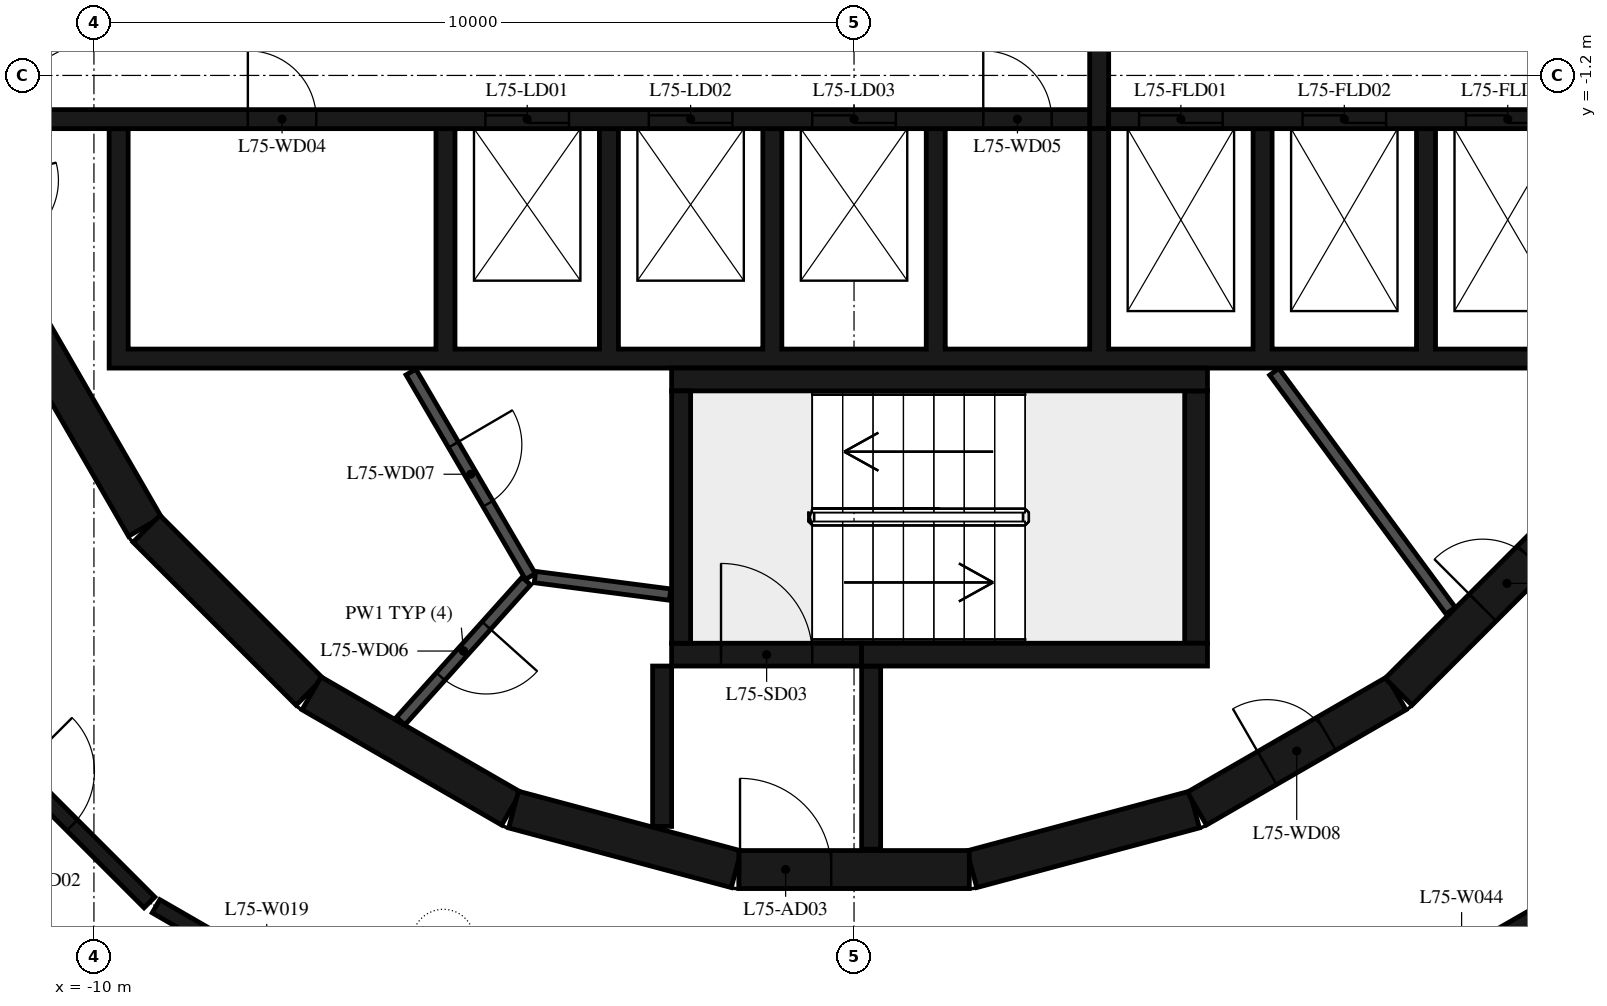
"""IFC4 building model, lengths in metres.
Left out: names, types, materials, properties, quantities, classifications, styles, units other than length and angle.
Written with IfcOpenShell. Run it as: python <this file> out.ifc"""

import sys

from ifc_helpers import new_model, si_unit, direction, frame, frame_2d, origin, place, context, subcontext, project, spatial, polyline, rectangle, outline, extrude, element, fill, save


model = new_model("IFC4")
c1 = context("Model", 3, precision=1e-05, world=origin(), true_north=direction((0.0, 1.0)))
c2 = subcontext(c1, "Body", "Model", "MODEL_VIEW")
j1 = project(units=[si_unit("LENGTHUNIT", "METRE"), si_unit("PLANEANGLEUNIT", "RADIAN")], contexts=[c1])
p1 = place(None, origin())
s1 = spatial("IfcSite", under=j1, at=p1, CompositionType="ELEMENT")
p2 = place(p1, origin())
s2 = spatial("IfcBuilding", under=s1, at=p2, CompositionType="ELEMENT")
p3 = place(p2, frame((0.0, 0.0, 291.4)))
s3 = spatial("IfcBuildingStorey", under=s2, at=p3, CompositionType="ELEMENT", Elevation=291.4)
p4 = place(p3, frame((1.55, -11.643, 0.0), z_axis=(0.0, 0.0, 1.0), x_axis=(0.965948410781, 0.258734743916, 0.0)))
e1 = element("IfcWall", 1, at=p4, inside=s3, PredefinedType="SHEAR", context=c2, shape_type="SweptSolid", body=[
    extrude(rectangle(XDim=3.033, YDim=0.5, at=frame_2d((1.516, 0.0))), origin(), (0.0, 0.0, 1.0), 6.35),
])
p5 = place(p3, frame((4.51, -10.845, 0.0), z_axis=(0.0, 0.0, 1.0), x_axis=(0.865975092491, 0.500087131594, 0.0)))
e2 = element("IfcWall", 2, at=p5, inside=s3, PredefinedType="SHEAR", context=c2, shape_type="SweptSolid", body=[
    extrude(rectangle(XDim=3.033, YDim=0.5, at=frame_2d((1.516, 0.0))), origin(), (0.0, 0.0, 1.0), 6.35),
])
p6 = place(p5, frame((1.066, 0.0, 0.0)))
e3 = element("IfcOpeningElement", 3, at=p6, cuts=e2, PredefinedType="OPENING", context=c2, shape_type="SweptSolid", body=[
    extrude(rectangle(XDim=0.9, YDim=2.1, at=frame_2d((0.45, 1.05))), frame((0.0, 0.26, 0.0), z_axis=(0.0, -1.0, 0.0), x_axis=(1.0, 0.0, 0.0)), (0.0, 0.0, 1.0), 0.52),
])
p7 = place(p3, frame((7.164, -9.308, 0.0), z_axis=(0.0, 0.0, 1.0), x_axis=(0.707106781187, 0.707106781187, 0.0)))
e4 = element("IfcWall", 4, at=p7, inside=s3, PredefinedType="SHEAR", context=c2, shape_type="SweptSolid", body=[
    extrude(rectangle(XDim=3.032, YDim=0.5, at=frame_2d((1.516, 0.0))), origin(), (0.0, 0.0, 1.0), 6.35),
])
p8 = place(p7, frame((1.566, 0.0, 0.0)))
e5 = element("IfcOpeningElement", 5, at=p8, cuts=e4, PredefinedType="OPENING", context=c2, shape_type="SweptSolid", body=[
    extrude(rectangle(XDim=0.9, YDim=2.1, at=frame_2d((0.45, 1.05))), frame((0.0, 0.26, 0.0), z_axis=(0.0, -1.0, 0.0), x_axis=(1.0, 0.0, 0.0)), (0.0, 0.0, 1.0), 0.52),
])
p9 = place(p3, frame((-10.845, -4.51, 0.0), z_axis=(0.0, 0.0, 1.0), x_axis=(0.500087131594, -0.865975092491, 0.0)))
e6 = element("IfcWall", 6, at=p9, inside=s3, PredefinedType="SHEAR", context=c2, shape_type="SweptSolid", body=[
    extrude(rectangle(XDim=3.033, YDim=0.5, at=frame_2d((1.516, 0.0))), origin(), (0.0, 0.0, 1.0), 6.35),
])
p10 = place(p3, frame((-9.308, -7.164, 0.0), z_axis=(0.0, 0.0, 1.0), x_axis=(0.707106781187, -0.707106781187, 0.0)))
e7 = element("IfcWall", 7, at=p10, inside=s3, PredefinedType="SHEAR", context=c2, shape_type="SweptSolid", body=[
    extrude(rectangle(XDim=3.032, YDim=0.5, at=frame_2d((1.516, 0.0))), origin(), (0.0, 0.0, 1.0), 6.35),
])
for number, where, z_axis, x_axis in (
    (8, (-7.137, -9.329, 0.0), (0.0, 0.0, 1.0), (0.866, -0.5, 0.0)),
    (9, (-4.479, -10.858, 0.0), (0.0, 0.0, 1.0), (0.966, -0.259, 0.0)),
):
    element("IfcWall", number, at=place(p3, frame(where, z_axis=z_axis, x_axis=x_axis)), inside=s3, PredefinedType="SHEAR", context=c2, shape_type="SweptSolid", body=[
        extrude(rectangle(XDim=3.033, YDim=0.5, at=frame_2d((1.516, 0.0))), origin(), (0.0, 0.0, 1.0), 6.35),
    ])
p11 = place(p3, frame((-1.516, -11.647, 0.0), z_axis=(0.0, 0.0, 1.0), x_axis=(1.0, 0.0, 0.0)))
e10 = element("IfcWall", 10, at=p11, inside=s3, PredefinedType="SHEAR", context=c2, shape_type="SweptSolid", body=[
    extrude(rectangle(XDim=3.033, YDim=0.5, at=frame_2d((1.516, 0.0))), origin(), (0.0, 0.0, 1.0), 6.35),
])
p12 = place(p11, frame((0.016, 0.0, 0.0)))
e11 = element("IfcOpeningElement", 11, at=p12, cuts=e10, PredefinedType="OPENING", context=c2, shape_type="SweptSolid", body=[
    extrude(rectangle(XDim=1.2, YDim=2.1, at=frame_2d((0.6, 1.05))), frame((0.0, 0.26, 0.0), z_axis=(0.0, -1.0, 0.0), x_axis=(1.0, 0.0, 0.0)), (0.0, 0.0, 1.0), 0.52),
])
p13 = place(p3, frame((-2.275, -8.67, 0.0), z_axis=(0.0, 0.0, 1.0), x_axis=(0.0, 1.0, 0.0)))
e12 = element("IfcWall", 12, at=p13, inside=s3, PredefinedType="SHEAR", context=c2, shape_type="SweptSolid", body=[
    extrude(rectangle(XDim=3.32, YDim=0.25, at=frame_2d((1.66, 0.0))), origin(), (0.0, 0.0, 1.0), 6.35),
])
p14 = place(p3, frame((-2.4, -5.2, 0.0), z_axis=(0.0, 0.0, 1.0), x_axis=(1.0, 0.0, 0.0)))
e13 = element("IfcWall", 13, at=p14, inside=s3, PredefinedType="SHEAR", context=c2, shape_type="SweptSolid", body=[
    extrude(rectangle(XDim=7.05, YDim=0.3, at=frame_2d((3.525, 0.0))), origin(), (0.0, 0.0, 1.0), 6.35),
])
p15 = place(p3, frame((4.5, -8.67, 0.0), z_axis=(0.0, 0.0, 1.0), x_axis=(0.0, 1.0, 0.0)))
e14 = element("IfcWall", 14, at=p15, inside=s3, PredefinedType="SHEAR", context=c2, shape_type="SweptSolid", body=[
    extrude(rectangle(XDim=3.32, YDim=0.3, at=frame_2d((1.66, 0.0))), origin(), (0.0, 0.0, 1.0), 6.35),
])
p16 = place(p3, frame((0.1, -8.82, 0.0), z_axis=(0.0, 0.0, 1.0), x_axis=(1.0, 0.0, 0.0)))
e15 = element("IfcWall", 15, at=p16, inside=s3, PredefinedType="SHEAR", context=c2, shape_type="SweptSolid", body=[
    extrude(rectangle(XDim=4.55, YDim=0.3, at=frame_2d((2.275, 0.0))), origin(), (0.0, 0.0, 1.0), 6.35),
])
p17 = place(p3, frame((-2.4, -8.82, 0.0), z_axis=(0.0, 0.0, 1.0), x_axis=(1.0, 0.0, 0.0)))
e16 = element("IfcWall", 16, at=p17, inside=s3, PredefinedType="SHEAR", context=c2, shape_type="SweptSolid", body=[
    extrude(rectangle(XDim=2.5, YDim=0.3, at=frame_2d((1.25, 0.0))), origin(), (0.0, 0.0, 1.0), 6.35),
])
p18 = place(p17, frame((0.65, 0.0, 0.0)))
e17 = element("IfcOpeningElement", 17, at=p18, cuts=e16, PredefinedType="OPENING", context=c2, shape_type="SweptSolid", body=[
    extrude(rectangle(XDim=1.2, YDim=2.1, at=frame_2d((0.6, 1.05))), frame((0.0, 0.16, 0.0), z_axis=(0.0, -1.0, 0.0), x_axis=(1.0, 0.0, 0.0)), (0.0, 0.0, 1.0), 0.32),
])
p19 = place(p3, frame((-2.525, -8.97, 0.0), z_axis=(0.0, 0.0, 1.0), x_axis=(0.0, -1.0, 0.0)))
e18 = element("IfcWall", 18, at=p19, inside=s3, PredefinedType="SHEAR", context=c2, shape_type="SweptSolid", body=[
    extrude(rectangle(XDim=2.11, YDim=0.25, at=frame_2d((1.055, 0.0))), origin(), (0.0, 0.0, 1.0), 6.35),
])
p20 = place(p3, frame((0.225, -8.97, 0.0), z_axis=(0.0, 0.0, 1.0), x_axis=(0.0, -1.0, 0.0)))
e19 = element("IfcWall", 19, at=p20, inside=s3, PredefinedType="SHEAR", context=c2, shape_type="SweptSolid", body=[
    extrude(rectangle(XDim=2.41, YDim=0.25, at=frame_2d((1.205, 0.0))), origin(), (0.0, 0.0, 1.0), 6.35),
])
p21 = place(p3, origin())
e20 = element("IfcWall", 20, at=p21, inside=s3, PredefinedType="SHEAR", context=c2, shape_type="SweptSolid", body=[
    extrude(outline(polyline([(9.8, -5.05), (9.8, -4.8), (9.8, -1.9), (9.55, -1.9), (9.55, -4.8), (7.65, -4.8), (7.65, -1.9), (7.4, -1.9), (7.4, -4.8), (5.5, -4.8), (5.5, -1.9), (5.25, -1.9), (5.25, -4.8), (3.35, -4.8), (3.35, -1.9), (3.1, -1.9), (3.1, -4.8), (1.2, -4.8), (1.2, -1.9), (0.95, -1.9), (0.95, -4.8), (-0.95, -4.8), (-0.95, -1.9), (-1.2, -1.9), (-1.2, -4.8), (-3.1, -4.8), (-3.1, -1.9), (-3.35, -1.9), (-3.35, -4.8), (-5.25, -4.8), (-5.25, -1.9), (-5.5, -1.9), (-5.5, -4.8), (-9.55, -4.8), (-9.55, -1.9), (-9.8, -1.9), (-9.8, -4.8), (-9.8, -5.05), (9.8, -5.05)])), origin(), (0.0, 0.0, 1.0), 6.35),
])
p22 = place(p3, frame((-11.28, -1.775, 0.0), z_axis=(0.0, 0.0, 1.0), x_axis=(1.0, 0.0, 0.0)))
e21 = element("IfcWall", 21, at=p22, inside=s3, PredefinedType="SHEAR", context=c2, shape_type="SweptSolid", body=[
    extrude(rectangle(XDim=14.38, YDim=0.25, at=frame_2d((7.19, 0.0))), origin(), (0.0, 0.0, 1.0), 6.35),
])
p23 = place(p22, frame((6.43, 0.0, 0.0)))
e22 = element("IfcOpeningElement", 22, at=p23, cuts=e21, PredefinedType="OPENING", context=c2, shape_type="SweptSolid", body=[
    extrude(rectangle(XDim=1.1, YDim=2.1, at=frame_2d((0.55, 1.05))), frame((0.0, 0.135, 0.0), z_axis=(0.0, -1.0, 0.0), x_axis=(1.0, 0.0, 0.0)), (0.0, 0.0, 1.0), 0.27),
])
p24 = place(p22, frame((8.58, 0.0, 0.0)))
e23 = element("IfcOpeningElement", 23, at=p24, cuts=e21, PredefinedType="OPENING", context=c2, shape_type="SweptSolid", body=[
    extrude(rectangle(XDim=1.1, YDim=2.1, at=frame_2d((0.55, 1.05))), frame((0.0, 0.135, 0.0), z_axis=(0.0, -1.0, 0.0), x_axis=(1.0, 0.0, 0.0)), (0.0, 0.0, 1.0), 0.27),
])
p25 = place(p22, frame((10.73, 0.0, 0.0)))
e24 = element("IfcOpeningElement", 24, at=p25, cuts=e21, PredefinedType="OPENING", context=c2, shape_type="SweptSolid", body=[
    extrude(rectangle(XDim=1.1, YDim=2.1, at=frame_2d((0.55, 1.05))), frame((0.0, 0.135, 0.0), z_axis=(0.0, -1.0, 0.0), x_axis=(1.0, 0.0, 0.0)), (0.0, 0.0, 1.0), 0.27),
])
p26 = place(p22, frame((3.305, 0.0, 0.0)))
e25 = element("IfcOpeningElement", 25, at=p26, cuts=e21, PredefinedType="OPENING", context=c2, shape_type="SweptSolid", body=[
    extrude(rectangle(XDim=0.9, YDim=2.1, at=frame_2d((0.45, 1.05))), frame((0.0, 0.135, 0.0), z_axis=(0.0, -1.0, 0.0), x_axis=(1.0, 0.0, 0.0)), (0.0, 0.0, 1.0), 0.27),
])
p27 = place(p22, frame((12.98, 0.0, 0.0)))
e26 = element("IfcOpeningElement", 26, at=p27, cuts=e21, PredefinedType="OPENING", context=c2, shape_type="SweptSolid", body=[
    extrude(rectangle(XDim=0.9, YDim=2.1, at=frame_2d((0.45, 1.05))), frame((0.0, 0.135, 0.0), z_axis=(0.0, -1.0, 0.0), x_axis=(1.0, 0.0, 0.0)), (0.0, 0.0, 1.0), 0.27),
])
p28 = place(p3, frame((3.35, -1.775, 0.0), z_axis=(0.0, 0.0, 1.0), x_axis=(1.0, 0.0, 0.0)))
e27 = element("IfcWall", 27, at=p28, inside=s3, PredefinedType="SHEAR", context=c2, shape_type="SweptSolid", body=[
    extrude(rectangle(XDim=7.93, YDim=0.25, at=frame_2d((3.965, 0.0))), origin(), (0.0, 0.0, 1.0), 6.35),
])
p29 = place(p28, frame((0.4, 0.0, 0.0)))
e28 = element("IfcOpeningElement", 28, at=p29, cuts=e27, PredefinedType="OPENING", context=c2, shape_type="SweptSolid", body=[
    extrude(rectangle(XDim=1.1, YDim=2.4, at=frame_2d((0.55, 1.2))), frame((0.0, 0.135, 0.0), z_axis=(0.0, -1.0, 0.0), x_axis=(1.0, 0.0, 0.0)), (0.0, 0.0, 1.0), 0.27),
])
p30 = place(p28, frame((2.55, 0.0, 0.0)))
e29 = element("IfcOpeningElement", 29, at=p30, cuts=e27, PredefinedType="OPENING", context=c2, shape_type="SweptSolid", body=[
    extrude(rectangle(XDim=1.1, YDim=2.4, at=frame_2d((0.55, 1.2))), frame((0.0, 0.135, 0.0), z_axis=(0.0, -1.0, 0.0), x_axis=(1.0, 0.0, 0.0)), (0.0, 0.0, 1.0), 0.27),
])
p31 = place(p28, frame((4.7, 0.0, 0.0)))
e30 = element("IfcOpeningElement", 30, at=p31, cuts=e27, PredefinedType="OPENING", context=c2, shape_type="SweptSolid", body=[
    extrude(rectangle(XDim=1.1, YDim=2.4, at=frame_2d((0.55, 1.2))), frame((0.0, 0.135, 0.0), z_axis=(0.0, -1.0, 0.0), x_axis=(1.0, 0.0, 0.0)), (0.0, 0.0, 1.0), 0.27),
])
p32 = place(p3, frame((3.225, -1.9, 0.0), z_axis=(0.0, 0.0, 1.0), x_axis=(0.0, 1.0, 0.0)))
e31 = element("IfcWall", 31, at=p32, inside=s3, PredefinedType="SHEAR", context=c2, shape_type="SweptSolid", body=[
    extrude(rectangle(XDim=3.8, YDim=0.25, at=frame_2d((1.9, 0.0))), origin(), (0.0, 0.0, 1.0), 6.35),
])
p33 = place(p3, frame((5.528, -5.098, 0.0), z_axis=(0.0, 0.0, 1.0), x_axis=(0.594034318069, -0.804439698769, 0.0)))
e32 = element("IfcWall", 32, at=p33, inside=s3, PredefinedType="PARTITIONING", context=c2, shape_type="SweptSolid", body=[
    extrude(rectangle(XDim=3.907, YDim=0.15, at=frame_2d((1.953, 0.0))), origin(), (0.0, 0.0, 1.0), 6.35),
])
p34 = place(p3, frame((-5.829, -5.102, 0.0), z_axis=(0.0, 0.0, 1.0), x_axis=(0.504480008384, -0.863423373057, 0.0)))
e33 = element("IfcWall", 33, at=p34, inside=s3, PredefinedType="PARTITIONING", context=c2, shape_type="SweptSolid", body=[
    extrude(rectangle(XDim=3.115, YDim=0.15, at=frame_2d((1.558, 0.0))), origin(), (0.0, 0.0, 1.0), 6.35),
])
p35 = place(p34, frame((1.107, 0.0, 0.0)))
e34 = element("IfcOpeningElement", 34, at=p35, cuts=e33, PredefinedType="OPENING", context=c2, shape_type="SweptSolid", body=[
    extrude(rectangle(XDim=0.9, YDim=2.1, at=frame_2d((0.45, 1.05))), frame((0.0, 0.085, 0.0), z_axis=(0.0, -1.0, 0.0), x_axis=(1.0, 0.0, 0.0)), (0.0, 0.0, 1.0), 0.17),
])
p36 = place(p3, frame((-4.311, -7.851, 0.0), z_axis=(0.0, 0.0, 1.0), x_axis=(-0.667869133096, -0.744278725383, 0.0)))
e35 = element("IfcWall", 35, at=p36, inside=s3, PredefinedType="PARTITIONING", context=c2, shape_type="SweptSolid", body=[
    extrude(rectangle(XDim=2.476, YDim=0.15, at=frame_2d((1.238, 0.0))), origin(), (0.0, 0.0, 1.0), 6.35),
])
p37 = place(p36, frame((0.788, 0.0, 0.0)))
e36 = element("IfcOpeningElement", 36, at=p37, cuts=e35, PredefinedType="OPENING", context=c2, shape_type="SweptSolid", body=[
    extrude(rectangle(XDim=0.9, YDim=2.1, at=frame_2d((0.45, 1.05))), frame((0.0, 0.085, 0.0), z_axis=(0.0, -1.0, 0.0), x_axis=(1.0, 0.0, 0.0)), (0.0, 0.0, 1.0), 0.17),
])
p38 = place(p3, frame((-4.198, -7.799, 0.0), z_axis=(0.0, 0.0, 1.0), x_axis=(0.991686747293, -0.128675542523, 0.0)))
e37 = element("IfcWall", 37, at=p38, inside=s3, PredefinedType="PARTITIONING", context=c2, shape_type="SweptSolid", body=[
    extrude(rectangle(XDim=1.793, YDim=0.15, at=frame_2d((0.896, 0.0))), origin(), (0.0, 0.0, 1.0), 6.35),
])
p39 = place(p3, frame((-12.009, -9.341, 0.0), z_axis=(0.0, 0.0, 1.0), x_axis=(0.707106781187, -0.707106781187, 0.0)))
e38 = element("IfcWall", 38, at=p39, inside=s3, PredefinedType="PARTITIONING", context=c2, shape_type="SweptSolid", body=[
    extrude(rectangle(XDim=3.874, YDim=0.2, at=frame_2d((1.937, 0.0))), origin(), (0.0, 0.0, 1.0), 6.35),
])
p40 = place(p39, frame((1.437, 0.0, 0.0)))
e39 = element("IfcOpeningElement", 39, at=p40, cuts=e38, PredefinedType="OPENING", context=c2, shape_type="SweptSolid", body=[
    extrude(rectangle(XDim=1.0, YDim=2.1, at=frame_2d((0.5, 1.05))), frame((0.0, 0.11, 0.0), z_axis=(0.0, -1.0, 0.0), x_axis=(1.0, 0.0, 0.0)), (0.0, 0.0, 1.0), 0.22),
])
p41 = place(p3, frame((-9.183, -12.13, 0.0), z_axis=(0.0, 0.0, 1.0), x_axis=(0.866261714877, -0.499590473626, 0.0)))
e40 = element("IfcWall", 40, at=p41, inside=s3, PredefinedType="PARTITIONING", context=c2, shape_type="SweptSolid", body=[
    extrude(rectangle(XDim=3.363, YDim=0.2, at=frame_2d((1.682, 0.0))), origin(), (0.0, 0.0, 1.0), 6.35),
])
p42 = place(p3, frame((6.717, -13.55, 0.0), z_axis=(0.0, 0.0, 1.0), x_axis=(0.86665285702, 0.498911640894, 0.0)))
e41 = element("IfcWall", 41, at=p42, inside=s3, PredefinedType="PARTITIONING", context=c2, shape_type="SweptSolid", body=[
    extrude(rectangle(XDim=2.946, YDim=0.2, at=frame_2d((1.473, 0.0))), origin(), (0.0, 0.0, 1.0), 6.35),
])
p43 = place(p18, origin())
e42 = element("IfcDoor", 42, at=p43, inside=s3, OperationType="SINGLE_SWING_LEFT", PredefinedType="DOOR", context=c2, shape_type="SweptSolid", body=[
    extrude(rectangle(XDim=1.2, YDim=2.1, at=frame_2d((0.6, 1.05))), frame((0.0, 0.025, 0.0), z_axis=(0.0, -1.0, 0.0), x_axis=(1.0, 0.0, 0.0)), (0.0, 0.0, 1.0), 0.05),
])
fill(e17, e42)
p44 = place(p12, origin())
e43 = element("IfcDoor", 43, at=p44, inside=s3, OperationType="SINGLE_SWING_RIGHT", PredefinedType="DOOR", context=c2, shape_type="SweptSolid", body=[
    extrude(rectangle(XDim=1.2, YDim=2.1, at=frame_2d((0.6, 1.05))), frame((0.0, 0.025, 0.0), z_axis=(0.0, -1.0, 0.0), x_axis=(1.0, 0.0, 0.0)), (0.0, 0.0, 1.0), 0.05),
])
fill(e11, e43)
p45 = place(p23, origin())
e44 = element("IfcDoor", 44, at=p45, inside=s3, OperationType="DOUBLE_DOOR_SLIDING", PredefinedType="DOOR", context=c2, shape_type="SweptSolid", body=[
    extrude(rectangle(XDim=1.1, YDim=2.1, at=frame_2d((0.55, 1.05))), frame((0.0, 0.025, 0.0), z_axis=(0.0, -1.0, 0.0), x_axis=(1.0, 0.0, 0.0)), (0.0, 0.0, 1.0), 0.05),
])
fill(e22, e44)
p46 = place(p24, origin())
e45 = element("IfcDoor", 45, at=p46, inside=s3, OperationType="DOUBLE_DOOR_SLIDING", PredefinedType="DOOR", context=c2, shape_type="SweptSolid", body=[
    extrude(rectangle(XDim=1.1, YDim=2.1, at=frame_2d((0.55, 1.05))), frame((0.0, 0.025, 0.0), z_axis=(0.0, -1.0, 0.0), x_axis=(1.0, 0.0, 0.0)), (0.0, 0.0, 1.0), 0.05),
])
fill(e23, e45)
p47 = place(p25, origin())
e46 = element("IfcDoor", 46, at=p47, inside=s3, OperationType="DOUBLE_DOOR_SLIDING", PredefinedType="DOOR", context=c2, shape_type="SweptSolid", body=[
    extrude(rectangle(XDim=1.1, YDim=2.1, at=frame_2d((0.55, 1.05))), frame((0.0, 0.025, 0.0), z_axis=(0.0, -1.0, 0.0), x_axis=(1.0, 0.0, 0.0)), (0.0, 0.0, 1.0), 0.05),
])
fill(e24, e46)
p48 = place(p29, origin())
e47 = element("IfcDoor", 47, at=p48, inside=s3, OperationType="DOUBLE_DOOR_SLIDING", PredefinedType="DOOR", context=c2, shape_type="SweptSolid", body=[
    extrude(rectangle(XDim=1.1, YDim=2.4, at=frame_2d((0.55, 1.2))), frame((0.0, 0.025, 0.0), z_axis=(0.0, -1.0, 0.0), x_axis=(1.0, 0.0, 0.0)), (0.0, 0.0, 1.0), 0.05),
])
fill(e28, e47)
p49 = place(p30, origin())
e48 = element("IfcDoor", 48, at=p49, inside=s3, OperationType="DOUBLE_DOOR_SLIDING", PredefinedType="DOOR", context=c2, shape_type="SweptSolid", body=[
    extrude(rectangle(XDim=1.1, YDim=2.4, at=frame_2d((0.55, 1.2))), frame((0.0, 0.025, 0.0), z_axis=(0.0, -1.0, 0.0), x_axis=(1.0, 0.0, 0.0)), (0.0, 0.0, 1.0), 0.05),
])
fill(e29, e48)
p50 = place(p31, origin())
e49 = element("IfcDoor", 49, at=p50, inside=s3, OperationType="DOUBLE_DOOR_SLIDING", PredefinedType="DOOR", context=c2, shape_type="SweptSolid", body=[
    extrude(rectangle(XDim=1.1, YDim=2.4, at=frame_2d((0.55, 1.2))), frame((0.0, 0.025, 0.0), z_axis=(0.0, -1.0, 0.0), x_axis=(1.0, 0.0, 0.0)), (0.0, 0.0, 1.0), 0.05),
])
fill(e30, e49)
p51 = place(p26, origin())
e50 = element("IfcDoor", 50, at=p51, inside=s3, OperationType="SINGLE_SWING_RIGHT", PredefinedType="DOOR", context=c2, shape_type="SweptSolid", body=[
    extrude(rectangle(XDim=0.9, YDim=2.1, at=frame_2d((0.45, 1.05))), frame((0.0, 0.025, 0.0), z_axis=(0.0, -1.0, 0.0), x_axis=(1.0, 0.0, 0.0)), (0.0, 0.0, 1.0), 0.05),
])
fill(e25, e50)
p52 = place(p27, origin())
e51 = element("IfcDoor", 51, at=p52, inside=s3, OperationType="SINGLE_SWING_LEFT", PredefinedType="DOOR", context=c2, shape_type="SweptSolid", body=[
    extrude(rectangle(XDim=0.9, YDim=2.1, at=frame_2d((0.45, 1.05))), frame((0.0, 0.025, 0.0), z_axis=(0.0, -1.0, 0.0), x_axis=(1.0, 0.0, 0.0)), (0.0, 0.0, 1.0), 0.05),
])
fill(e26, e51)
p53 = place(p37, origin())
e52 = element("IfcDoor", 52, at=p53, inside=s3, OperationType="SINGLE_SWING_RIGHT", PredefinedType="DOOR", context=c2, shape_type="SweptSolid", body=[
    extrude(rectangle(XDim=0.9, YDim=2.1, at=frame_2d((0.45, 1.05))), frame((0.0, 0.025, 0.0), z_axis=(0.0, -1.0, 0.0), x_axis=(1.0, 0.0, 0.0)), (0.0, 0.0, 1.0), 0.05),
])
fill(e36, e52)
p54 = place(p35, origin())
e53 = element("IfcDoor", 53, at=p54, inside=s3, OperationType="SINGLE_SWING_LEFT", PredefinedType="DOOR", context=c2, shape_type="SweptSolid", body=[
    extrude(rectangle(XDim=0.9, YDim=2.1, at=frame_2d((0.45, 1.05))), frame((0.0, 0.025, 0.0), z_axis=(0.0, -1.0, 0.0), x_axis=(1.0, 0.0, 0.0)), (0.0, 0.0, 1.0), 0.05),
])
fill(e34, e53)
p55 = place(p6, origin())
e54 = element("IfcDoor", 54, at=p55, inside=s3, OperationType="SINGLE_SWING_RIGHT", PredefinedType="DOOR", context=c2, shape_type="SweptSolid", body=[
    extrude(rectangle(XDim=0.9, YDim=2.1, at=frame_2d((0.45, 1.05))), frame((0.0, 0.025, 0.0), z_axis=(0.0, -1.0, 0.0), x_axis=(1.0, 0.0, 0.0)), (0.0, 0.0, 1.0), 0.05),
])
fill(e3, e54)
p56 = place(p8, origin())
e55 = element("IfcDoor", 55, at=p56, inside=s3, OperationType="SINGLE_SWING_LEFT", PredefinedType="DOOR", context=c2, shape_type="SweptSolid", body=[
    extrude(rectangle(XDim=0.9, YDim=2.1, at=frame_2d((0.45, 1.05))), frame((0.0, 0.025, 0.0), z_axis=(0.0, -1.0, 0.0), x_axis=(1.0, 0.0, 0.0)), (0.0, 0.0, 1.0), 0.05),
])
fill(e5, e55)
p57 = place(p40, origin())
e56 = element("IfcDoor", 56, at=p57, inside=s3, OperationType="SINGLE_SWING_LEFT", PredefinedType="DOOR", context=c2, shape_type="SweptSolid", body=[
    extrude(rectangle(XDim=1.0, YDim=2.1, at=frame_2d((0.5, 1.05))), frame((0.0, 0.025, 0.0), z_axis=(0.0, -1.0, 0.0), x_axis=(1.0, 0.0, 0.0)), (0.0, 0.0, 1.0), 0.05),
])
fill(e39, e56)
save(model, sys.argv[1])
